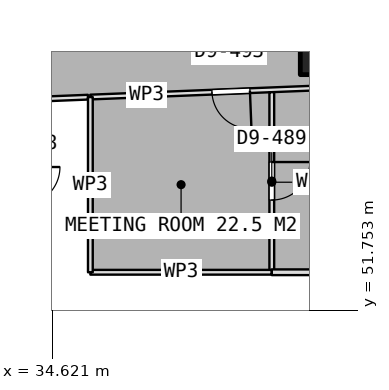
"""IFC4 building model, lengths in metres.
Left out: names, types, materials, properties, quantities, classifications, styles, units other than length and angle.
Written with IfcOpenShell. Run it as: python <this file> out.ifc"""

import sys

from ifc_helpers import new_model, si_unit, direction, frame, frame_2d, origin, origin_2d, place, context, subcontext, project, spatial, rectangle, extrude, element, fill, save


model = new_model("IFC4")
c1 = context("Model", 3, precision=1e-05, world=origin(), true_north=direction((0.0, 1.0)))
c2 = subcontext(c1, "Body", "Model", "MODEL_VIEW")
j1 = project(units=[si_unit("LENGTHUNIT", "METRE"), si_unit("PLANEANGLEUNIT", "RADIAN")], contexts=[c1])
p1 = place(None, origin())
s1 = spatial("IfcSite", under=j1, at=p1, CompositionType="ELEMENT")
p2 = place(p1, origin())
s2 = spatial("IfcBuilding", under=s1, at=p2, CompositionType="ELEMENT")
p3 = place(p2, frame((0.0, 0.0, 125.3)))
s3 = spatial("IfcBuildingStorey", under=s2, at=p3, CompositionType="ELEMENT", Elevation=125.3)
p4 = place(p3, frame((42.0, 58.8, 0.0), z_axis=(0.0, 0.0, 1.0), x_axis=(1.0, 0.0, 0.0)))
e1 = element("IfcColumn", 1, at=p4, inside=s3, PredefinedType="COLUMN", context=c2, shape_type="SweptSolid", body=[
    extrude(rectangle(XDim=1.7, YDim=1.7, at=origin_2d()), origin(), (0.0, 0.0, 1.0), 3.75),
])
p5 = place(p3, frame((35.563, 57.357, 0.0), z_axis=(0.0, 0.0, 1.0), x_axis=(-0.999191272238, -0.04020947008, 0.0)))
e2 = element("IfcWall", 2, at=p5, inside=s3, PredefinedType="PARTITIONING", context=c2, shape_type="SweptSolid", body=[
    extrude(rectangle(XDim=1.737, YDim=0.125, at=frame_2d((0.868, 0.0))), origin(), (0.0, 0.0, 1.0), 3.5),
])
p6 = place(p3, frame((43.023, 57.656, 0.0), z_axis=(0.0, 0.0, 1.0), x_axis=(-0.999200853354, -0.039970672462, 0.0)))
e3 = element("IfcWall", 3, at=p6, inside=s3, PredefinedType="PARTITIONING", context=c2, shape_type="SweptSolid", body=[
    extrude(rectangle(XDim=7.403, YDim=0.125, at=frame_2d((3.701, 0.0))), origin(), (0.0, 0.0, 1.0), 3.5),
])
p7 = place(p6, frame((3.201, 0.0, 0.0)))
e4 = element("IfcOpeningElement", 4, at=p7, cuts=e3, PredefinedType="OPENING", context=c2, shape_type="SweptSolid", body=[
    extrude(rectangle(XDim=1.0, YDim=2.1, at=frame_2d((0.5, 1.05))), frame((0.0, 0.073, 0.0), z_axis=(0.0, -1.0, 0.0), x_axis=(1.0, 0.0, 0.0)), (0.0, 0.0, 1.0), 0.145),
])
p8 = place(p3, frame((40.4, 57.488, 0.0), z_axis=(0.0, 0.0, 1.0), x_axis=(0.0, -1.0, 0.0)))
e5 = element("IfcWall", 5, at=p8, inside=s3, PredefinedType="PARTITIONING", context=c2, shape_type="SweptSolid", body=[
    extrude(rectangle(XDim=4.738, YDim=0.125, at=frame_2d((2.369, 0.0))), origin(), (0.0, 0.0, 1.0), 3.5),
])
p9 = place(p8, frame((1.838, 0.0, 0.0)))
e6 = element("IfcOpeningElement", 6, at=p9, cuts=e5, PredefinedType="OPENING", context=c2, shape_type="SweptSolid", body=[
    extrude(rectangle(XDim=1.0, YDim=2.1, at=frame_2d((0.5, 1.05))), frame((0.0, 0.073, 0.0), z_axis=(0.0, -1.0, 0.0), x_axis=(1.0, 0.0, 0.0)), (0.0, 0.0, 1.0), 0.145),
])
p10 = place(p3, frame((40.4, 52.75, 0.0), z_axis=(0.0, 0.0, 1.0), x_axis=(-1.0, 0.0, 0.0)))
e7 = element("IfcWall", 7, at=p10, inside=s3, PredefinedType="PARTITIONING", context=c2, shape_type="SweptSolid", body=[
    extrude(rectangle(XDim=4.774, YDim=0.125, at=frame_2d((2.387, 0.0))), origin(), (0.0, 0.0, 1.0), 3.5),
])
p11 = place(p3, frame((35.626, 52.75, 0.0), z_axis=(0.0, 0.0, 1.0), x_axis=(0.0, 1.0, 0.0)))
e8 = element("IfcWall", 8, at=p11, inside=s3, PredefinedType="PARTITIONING", context=c2, shape_type="SweptSolid", body=[
    extrude(rectangle(XDim=4.61, YDim=0.125, at=frame_2d((2.305, 0.0))), origin(), (0.0, 0.0, 1.0), 3.5),
])
p12 = place(p3, frame((53.2, 52.75, 0.0), z_axis=(0.0, 0.0, 1.0), x_axis=(-1.0, 0.0, 0.0)))
e9 = element("IfcWall", 9, at=p12, inside=s3, PredefinedType="PARTITIONING", context=c2, shape_type="SweptSolid", body=[
    extrude(rectangle(XDim=12.8, YDim=0.15, at=frame_2d((6.4, 0.0))), origin(), (0.0, 0.0, 1.0), 3.5),
])
p13 = place(p9, origin())
e10 = element("IfcDoor", 10, at=p13, inside=s3, OperationType="SINGLE_SWING_LEFT", PredefinedType="DOOR", context=c2, shape_type="SweptSolid", body=[
    extrude(rectangle(XDim=1.0, YDim=2.1, at=frame_2d((0.5, 1.05))), frame((0.0, 0.025, 0.0), z_axis=(0.0, -1.0, 0.0), x_axis=(1.0, 0.0, 0.0)), (0.0, 0.0, 1.0), 0.05),
])
fill(e6, e10)
p14 = place(p7, origin())
e11 = element("IfcDoor", 11, at=p14, inside=s3, OperationType="SINGLE_SWING_LEFT", PredefinedType="DOOR", context=c2, shape_type="SweptSolid", body=[
    extrude(rectangle(XDim=1.0, YDim=2.1, at=frame_2d((0.5, 1.05))), frame((0.0, 0.025, 0.0), z_axis=(0.0, -1.0, 0.0), x_axis=(1.0, 0.0, 0.0)), (0.0, 0.0, 1.0), 0.05),
])
fill(e4, e11)
save(model, sys.argv[1])
